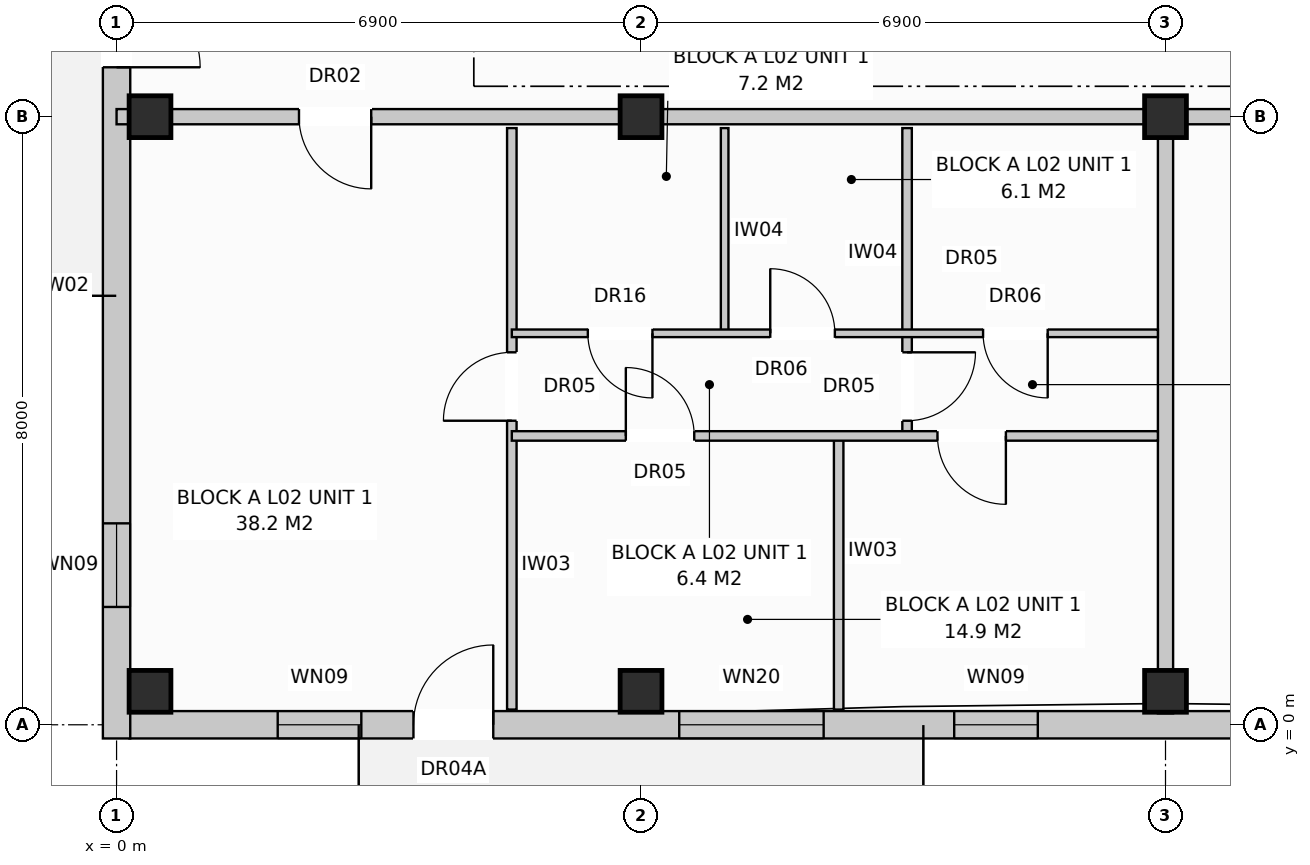
"""IFC4 building model, lengths in metres.
Left out: names, types, materials, properties, quantities, classifications, styles, units other than length and angle.
Written with IfcOpenShell. Run it as: python <this file> out.ifc"""

import sys

from ifc_helpers import new_model, si_unit, direction, frame, frame_2d, origin, origin_with_axes, origin_2d, place, context, subcontext, project, spatial, rectangle, extrude, element, fill, save


model = new_model("IFC4")
c1 = context("Model", 3, precision=1e-05, world=origin(), true_north=direction((0.0, 1.0)))
c2 = subcontext(c1, "Body", "Model", "MODEL_VIEW")
j1 = project(units=[si_unit("LENGTHUNIT", "METRE"), si_unit("PLANEANGLEUNIT", "RADIAN")], contexts=[c1])
p1 = place(None, origin())
s1 = spatial("IfcSite", under=j1, at=p1, CompositionType="ELEMENT")
p2 = place(p1, origin())
s2 = spatial("IfcBuilding", under=s1, at=p2, CompositionType="ELEMENT")
p3 = place(p2, frame((0.0, 0.0, 8.0)))
s3 = spatial("IfcBuildingStorey", under=s2, at=p3, CompositionType="ELEMENT", Elevation=8.0)
for number, where, z_axis, x_axis in (
    (1, (0.44, 0.44, 0.0), (0.0, 0.0, 1.0), (1.0, 0.0, 0.0)),
    (2, (0.44, 8.0, 0.0), (0.0, 0.0, 1.0), (1.0, 0.0, 0.0)),
    (3, (6.9, 0.44, 0.0), (0.0, 0.0, 1.0), (1.0, 0.0, 0.0)),
    (4, (6.9, 8.0, 0.0), (0.0, 0.0, 1.0), (1.0, 0.0, 0.0)),
    (5, (13.8, 0.44, 0.0), (0.0, 0.0, 1.0), (1.0, 0.0, 0.0)),
    (6, (13.8, 8.0, 0.0), (0.0, 0.0, 1.0), (1.0, 0.0, 0.0)),
):
    element("IfcColumn", number, at=place(p3, frame(where, z_axis=z_axis, x_axis=x_axis)), inside=s3, PredefinedType="COLUMN", context=c2, shape_type="SweptSolid", body=[
        extrude(rectangle(XDim=0.55, YDim=0.55, at=origin_2d()), origin(), (0.0, 0.0, 1.0), 3.2),
    ])
p4 = place(p3, frame((0.17, 0.0, 0.0), z_axis=(0.0, 0.0, 1.0), x_axis=(1.0, 0.0, 0.0)))
e7 = element("IfcWall", 7, at=p4, inside=s3, PredefinedType="STANDARD", context=c2, shape_type="SweptSolid", body=[
    extrude(rectangle(XDim=54.86, YDim=0.36, at=frame_2d((27.43, 0.0))), origin(), (0.0, 0.0, 1.0), 2.94),
])
p5 = place(p4, frame((3.736, 0.0, 0.0)))
e8 = element("IfcOpeningElement", 8, at=p5, cuts=e7, PredefinedType="OPENING", context=c2, shape_type="SweptSolid", body=[
    extrude(rectangle(XDim=1.05, YDim=2.12, at=frame_2d((0.525, 1.06))), frame((0.0, 0.192, 0.0), z_axis=(0.0, -1.0, 0.0), x_axis=(1.0, 0.0, 0.0)), (0.0, 0.0, 1.0), 0.384),
])
p6 = place(p4, frame((18.636, 0.0, 0.0)))
e9 = element("IfcOpeningElement", 9, at=p6, cuts=e7, PredefinedType="OPENING", context=c2, shape_type="SweptSolid", body=[
    extrude(rectangle(XDim=1.05, YDim=2.12, at=frame_2d((0.525, 1.06))), frame((0.0, 0.192, 0.0), z_axis=(0.0, -1.0, 0.0), x_axis=(1.0, 0.0, 0.0)), (0.0, 0.0, 1.0), 0.384),
])
p7 = place(p4, frame((32.636, 0.0, 0.0)))
e10 = element("IfcOpeningElement", 10, at=p7, cuts=e7, PredefinedType="OPENING", context=c2, shape_type="SweptSolid", body=[
    extrude(rectangle(XDim=1.05, YDim=2.12, at=frame_2d((0.525, 1.06))), frame((0.0, 0.192, 0.0), z_axis=(0.0, -1.0, 0.0), x_axis=(1.0, 0.0, 0.0)), (0.0, 0.0, 1.0), 0.384),
])
p8 = place(p4, frame((46.441, 0.0, 0.0)))
e11 = element("IfcOpeningElement", 11, at=p8, cuts=e7, PredefinedType="OPENING", context=c2, shape_type="SweptSolid", body=[
    extrude(rectangle(XDim=1.05, YDim=2.12, at=frame_2d((0.525, 1.06))), frame((0.0, 0.192, 0.0), z_axis=(0.0, -1.0, 0.0), x_axis=(1.0, 0.0, 0.0)), (0.0, 0.0, 1.0), 0.384),
])
p9 = place(p4, frame((1.95, 0.0, 0.72)))
e12 = element("IfcOpeningElement", 12, at=p9, cuts=e7, PredefinedType="OPENING", context=c2, shape_type="SweptSolid", body=[
    extrude(rectangle(XDim=1.1, YDim=1.5, at=frame_2d((0.55, 0.75))), frame((0.0, 0.192, 0.0), z_axis=(0.0, -1.0, 0.0), x_axis=(1.0, 0.0, 0.0)), (0.0, 0.0, 1.0), 0.384),
])
p10 = place(p4, frame((7.232, 0.0, 0.72)))
e13 = element("IfcOpeningElement", 13, at=p10, cuts=e7, PredefinedType="OPENING", context=c2, shape_type="SweptSolid", body=[
    extrude(rectangle(XDim=1.9, YDim=1.85, at=frame_2d((0.95, 0.925))), frame((0.0, 0.192, 0.0), z_axis=(0.0, -1.0, 0.0), x_axis=(1.0, 0.0, 0.0)), (0.0, 0.0, 1.0), 0.384),
])
p11 = place(p4, frame((10.85, 0.0, 0.72)))
e14 = element("IfcOpeningElement", 14, at=p11, cuts=e7, PredefinedType="OPENING", context=c2, shape_type="SweptSolid", body=[
    extrude(rectangle(XDim=1.1, YDim=1.5, at=frame_2d((0.55, 0.75))), frame((0.0, 0.192, 0.0), z_axis=(0.0, -1.0, 0.0), x_axis=(1.0, 0.0, 0.0)), (0.0, 0.0, 1.0), 0.384),
])
p12 = place(p4, frame((16.25, 0.0, 0.72)))
e15 = element("IfcOpeningElement", 15, at=p12, cuts=e7, PredefinedType="OPENING", context=c2, shape_type="SweptSolid", body=[
    extrude(rectangle(XDim=1.1, YDim=1.5, at=frame_2d((0.55, 0.75))), frame((0.0, 0.192, 0.0), z_axis=(0.0, -1.0, 0.0), x_axis=(1.0, 0.0, 0.0)), (0.0, 0.0, 1.0), 0.384),
])
p13 = place(p4, frame((21.55, 0.0, 0.72)))
e16 = element("IfcOpeningElement", 16, at=p13, cuts=e7, PredefinedType="OPENING", context=c2, shape_type="SweptSolid", body=[
    extrude(rectangle(XDim=1.9, YDim=1.85, at=frame_2d((0.95, 0.925))), frame((0.0, 0.192, 0.0), z_axis=(0.0, -1.0, 0.0), x_axis=(1.0, 0.0, 0.0)), (0.0, 0.0, 1.0), 0.384),
])
p14 = place(p4, frame((28.35, 0.0, 0.72)))
e17 = element("IfcOpeningElement", 17, at=p14, cuts=e7, PredefinedType="OPENING", context=c2, shape_type="SweptSolid", body=[
    extrude(rectangle(XDim=1.1, YDim=1.5, at=frame_2d((0.55, 0.75))), frame((0.0, 0.192, 0.0), z_axis=(0.0, -1.0, 0.0), x_axis=(1.0, 0.0, 0.0)), (0.0, 0.0, 1.0), 0.384),
])
p15 = place(p4, frame((30.8, 0.0, 0.85)))
e18 = element("IfcOpeningElement", 18, at=p15, cuts=e7, PredefinedType="OPENING", context=c2, shape_type="SweptSolid", body=[
    extrude(rectangle(XDim=1.5, YDim=1.65, at=frame_2d((0.75, 0.825))), frame((0.0, 0.192, 0.0), z_axis=(0.0, -1.0, 0.0), x_axis=(1.0, 0.0, 0.0)), (0.0, 0.0, 1.0), 0.384),
])
p16 = place(p4, frame((35.55, 0.0, 0.72)))
e19 = element("IfcOpeningElement", 19, at=p16, cuts=e7, PredefinedType="OPENING", context=c2, shape_type="SweptSolid", body=[
    extrude(rectangle(XDim=1.9, YDim=1.85, at=frame_2d((0.95, 0.925))), frame((0.0, 0.192, 0.0), z_axis=(0.0, -1.0, 0.0), x_axis=(1.0, 0.0, 0.0)), (0.0, 0.0, 1.0), 0.384),
])
p17 = place(p4, frame((39.25, 0.0, 0.72)))
e20 = element("IfcOpeningElement", 20, at=p17, cuts=e7, PredefinedType="OPENING", context=c2, shape_type="SweptSolid", body=[
    extrude(rectangle(XDim=1.1, YDim=1.5, at=frame_2d((0.55, 0.75))), frame((0.0, 0.192, 0.0), z_axis=(0.0, -1.0, 0.0), x_axis=(1.0, 0.0, 0.0)), (0.0, 0.0, 1.0), 0.384),
])
p18 = place(p4, frame((44.3, 0.0, 0.8)))
e21 = element("IfcOpeningElement", 21, at=p18, cuts=e7, PredefinedType="OPENING", context=c2, shape_type="SweptSolid", body=[
    extrude(rectangle(XDim=1.8, YDim=1.7, at=frame_2d((0.9, 0.85))), frame((0.0, 0.192, 0.0), z_axis=(0.0, -1.0, 0.0), x_axis=(1.0, 0.0, 0.0)), (0.0, 0.0, 1.0), 0.384),
])
p19 = place(p4, frame((49.15, 0.0, 0.72)))
e22 = element("IfcOpeningElement", 22, at=p19, cuts=e7, PredefinedType="OPENING", context=c2, shape_type="SweptSolid", body=[
    extrude(rectangle(XDim=1.9, YDim=1.85, at=frame_2d((0.95, 0.925))), frame((0.0, 0.192, 0.0), z_axis=(0.0, -1.0, 0.0), x_axis=(1.0, 0.0, 0.0)), (0.0, 0.0, 1.0), 0.384),
])
p20 = place(p4, frame((52.95, 0.0, 0.72)))
e23 = element("IfcOpeningElement", 23, at=p20, cuts=e7, PredefinedType="OPENING", context=c2, shape_type="SweptSolid", body=[
    extrude(rectangle(XDim=1.1, YDim=1.5, at=frame_2d((0.55, 0.75))), frame((0.0, 0.192, 0.0), z_axis=(0.0, -1.0, 0.0), x_axis=(1.0, 0.0, 0.0)), (0.0, 0.0, 1.0), 0.384),
])
p21 = place(p3, frame((0.0, -0.18, 0.0), z_axis=(0.0, 0.0, 1.0), x_axis=(0.0, 1.0, 0.0)))
e24 = element("IfcWall", 24, at=p21, inside=s3, PredefinedType="STANDARD", context=c2, shape_type="SweptSolid", body=[
    extrude(rectangle(XDim=18.76, YDim=0.36, at=frame_2d((9.38, 0.0))), origin(), (0.0, 0.0, 1.0), 2.94),
])
p22 = place(p21, frame((8.83, 0.0, 0.0)))
e25 = element("IfcOpeningElement", 25, at=p22, cuts=e24, PredefinedType="OPENING", context=c2, shape_type="SweptSolid", body=[
    extrude(rectangle(XDim=1.1, YDim=2.1, at=frame_2d((0.55, 1.05))), frame((0.0, 0.192, 0.0), z_axis=(0.0, -1.0, 0.0), x_axis=(1.0, 0.0, 0.0)), (0.0, 0.0, 1.0), 0.384),
])
p23 = place(p21, frame((1.73, 0.0, 0.72)))
e26 = element("IfcOpeningElement", 26, at=p23, cuts=e24, PredefinedType="OPENING", context=c2, shape_type="SweptSolid", body=[
    extrude(rectangle(XDim=1.1, YDim=1.5, at=frame_2d((0.55, 0.75))), frame((0.0, 0.192, 0.0), z_axis=(0.0, -1.0, 0.0), x_axis=(1.0, 0.0, 0.0)), (0.0, 0.0, 1.0), 0.384),
])
p24 = place(p21, frame((15.93, 0.0, 0.72)))
e27 = element("IfcOpeningElement", 27, at=p24, cuts=e24, PredefinedType="OPENING", context=c2, shape_type="SweptSolid", body=[
    extrude(rectangle(XDim=1.1, YDim=1.5, at=frame_2d((0.55, 0.75))), frame((0.0, 0.192, 0.0), z_axis=(0.0, -1.0, 0.0), x_axis=(1.0, 0.0, 0.0)), (0.0, 0.0, 1.0), 0.384),
])
p25 = place(p3, frame((13.8, 7.85, 0.0), z_axis=(0.0, 0.0, 1.0), x_axis=(0.0, -1.0, 0.0)))
e28 = element("IfcWall", 28, at=p25, inside=s3, PredefinedType="PARTITIONING", context=c2, shape_type="SweptSolid", body=[
    extrude(rectangle(XDim=7.7, YDim=0.2, at=frame_2d((3.85, 0.0))), origin(), (0.0, 0.0, 1.0), 2.94),
])
p26 = place(p3, frame((0.0, 8.0, 0.0), z_axis=(0.0, 0.0, 1.0), x_axis=(1.0, 0.0, 0.0)))
e29 = element("IfcWall", 29, at=p26, inside=s3, PredefinedType="PARTITIONING", context=c2, shape_type="SweptSolid", body=[
    extrude(rectangle(XDim=13.8, YDim=0.2, at=frame_2d((6.9, 0.0))), origin(), (0.0, 0.0, 1.0), 2.38),
])
p27 = place(p26, frame((2.4, 0.0, 0.0)))
e30 = element("IfcOpeningElement", 30, at=p27, cuts=e29, PredefinedType="OPENING", context=c2, shape_type="SweptSolid", body=[
    extrude(rectangle(XDim=0.95, YDim=2.15, at=frame_2d((0.475, 1.075))), frame((0.0, 0.112, 0.0), z_axis=(0.0, -1.0, 0.0), x_axis=(1.0, 0.0, 0.0)), (0.0, 0.0, 1.0), 0.224),
])
p28 = place(p3, frame((5.2, 7.85, 0.0), z_axis=(0.0, 0.0, 1.0), x_axis=(0.0, -1.0, 0.0)))
e31 = element("IfcWall", 31, at=p28, inside=s3, PredefinedType="PARTITIONING", context=c2, shape_type="SweptSolid", body=[
    extrude(rectangle(XDim=7.65, YDim=0.125, at=frame_2d((3.825, 0.0))), origin(), (0.0, 0.0, 1.0), 2.94),
])
p29 = place(p28, frame((2.95, 0.0, 0.0)))
e32 = element("IfcOpeningElement", 32, at=p29, cuts=e31, PredefinedType="OPENING", context=c2, shape_type="SweptSolid", body=[
    extrude(rectangle(XDim=0.9, YDim=2.1, at=frame_2d((0.45, 1.05))), frame((0.0, 0.074, 0.0), z_axis=(0.0, -1.0, 0.0), x_axis=(1.0, 0.0, 0.0)), (0.0, 0.0, 1.0), 0.149),
])
p30 = place(p3, frame((8.0, 7.85, 0.0), z_axis=(0.0, 0.0, 1.0), x_axis=(0.0, -1.0, 0.0)))
e33 = element("IfcWall", 33, at=p30, inside=s3, PredefinedType="PARTITIONING", context=c2, shape_type="SweptSolid", body=[
    extrude(rectangle(XDim=2.7, YDim=0.1, at=frame_2d((1.35, 0.0))), origin(), (0.0, 0.0, 1.0), 2.94),
])
p31 = place(p3, frame((10.4, 7.85, 0.0), z_axis=(0.0, 0.0, 1.0), x_axis=(0.0, -1.0, 0.0)))
e34 = element("IfcWall", 34, at=p31, inside=s3, PredefinedType="PARTITIONING", context=c2, shape_type="SweptSolid", body=[
    extrude(rectangle(XDim=4.05, YDim=0.125, at=frame_2d((2.025, 0.0))), origin(), (0.0, 0.0, 1.0), 2.94),
])
p32 = place(p31, frame((2.95, 0.0, 0.0)))
e35 = element("IfcOpeningElement", 35, at=p32, cuts=e34, PredefinedType="OPENING", context=c2, shape_type="SweptSolid", body=[
    extrude(rectangle(XDim=0.9, YDim=2.1, at=frame_2d((0.45, 1.05))), frame((0.0, 0.074, 0.0), z_axis=(0.0, -1.0, 0.0), x_axis=(1.0, 0.0, 0.0)), (0.0, 0.0, 1.0), 0.149),
])
p33 = place(p3, frame((9.5, 3.8, 0.0), z_axis=(0.0, 0.0, 1.0), x_axis=(0.0, -1.0, 0.0)))
e36 = element("IfcWall", 36, at=p33, inside=s3, PredefinedType="PARTITIONING", context=c2, shape_type="SweptSolid", body=[
    extrude(rectangle(XDim=3.6, YDim=0.125, at=frame_2d((1.8, 0.0))), origin(), (0.0, 0.0, 1.0), 2.94),
])
p34 = place(p3, frame((5.2, 5.15, 0.0), z_axis=(0.0, 0.0, 1.0), x_axis=(1.0, 0.0, 0.0)))
e37 = element("IfcWall", 37, at=p34, inside=s3, PredefinedType="PARTITIONING", context=c2, shape_type="SweptSolid", body=[
    extrude(rectangle(XDim=8.5, YDim=0.1, at=frame_2d((4.25, 0.0))), origin(), (0.0, 0.0, 1.0), 2.94),
])
p35 = place(p34, frame((1.0, 0.0, 0.0)))
e38 = element("IfcOpeningElement", 38, at=p35, cuts=e37, PredefinedType="OPENING", context=c2, shape_type="SweptSolid", body=[
    extrude(rectangle(XDim=0.85, YDim=2.1, at=frame_2d((0.425, 1.05))), frame((0.0, 0.062, 0.0), z_axis=(0.0, -1.0, 0.0), x_axis=(1.0, 0.0, 0.0)), (0.0, 0.0, 1.0), 0.124),
])
p36 = place(p34, frame((3.4, 0.0, 0.0)))
e39 = element("IfcOpeningElement", 39, at=p36, cuts=e37, PredefinedType="OPENING", context=c2, shape_type="SweptSolid", body=[
    extrude(rectangle(XDim=0.85, YDim=2.05, at=frame_2d((0.425, 1.025))), frame((0.0, 0.062, 0.0), z_axis=(0.0, -1.0, 0.0), x_axis=(1.0, 0.0, 0.0)), (0.0, 0.0, 1.0), 0.124),
])
p37 = place(p34, frame((6.2, 0.0, 0.0)))
e40 = element("IfcOpeningElement", 40, at=p37, cuts=e37, PredefinedType="OPENING", context=c2, shape_type="SweptSolid", body=[
    extrude(rectangle(XDim=0.85, YDim=2.05, at=frame_2d((0.425, 1.025))), frame((0.0, 0.062, 0.0), z_axis=(0.0, -1.0, 0.0), x_axis=(1.0, 0.0, 0.0)), (0.0, 0.0, 1.0), 0.124),
])
p38 = place(p3, frame((5.2, 3.8, 0.0), z_axis=(0.0, 0.0, 1.0), x_axis=(1.0, 0.0, 0.0)))
e41 = element("IfcWall", 41, at=p38, inside=s3, PredefinedType="PARTITIONING", context=c2, shape_type="SweptSolid", body=[
    extrude(rectangle(XDim=8.5, YDim=0.125, at=frame_2d((4.25, 0.0))), origin(), (0.0, 0.0, 1.0), 2.94),
])
p39 = place(p38, frame((1.5, 0.0, 0.0)))
e42 = element("IfcOpeningElement", 42, at=p39, cuts=e41, PredefinedType="OPENING", context=c2, shape_type="SweptSolid", body=[
    extrude(rectangle(XDim=0.9, YDim=2.1, at=frame_2d((0.45, 1.05))), frame((0.0, 0.074, 0.0), z_axis=(0.0, -1.0, 0.0), x_axis=(1.0, 0.0, 0.0)), (0.0, 0.0, 1.0), 0.149),
])
p40 = place(p38, frame((5.6, 0.0, 0.0)))
e43 = element("IfcOpeningElement", 43, at=p40, cuts=e41, PredefinedType="OPENING", context=c2, shape_type="SweptSolid", body=[
    extrude(rectangle(XDim=0.9, YDim=2.1, at=frame_2d((0.45, 1.05))), frame((0.0, 0.074, 0.0), z_axis=(0.0, -1.0, 0.0), x_axis=(1.0, 0.0, 0.0)), (0.0, 0.0, 1.0), 0.149),
])
p41 = place(p3, frame((13.8, 8.0, 0.0), z_axis=(0.0, 0.0, 1.0), x_axis=(1.0, 0.0, 0.0)))
e44 = element("IfcWall", 44, at=p41, inside=s3, PredefinedType="PARTITIONING", context=c2, shape_type="SweptSolid", body=[
    extrude(rectangle(XDim=20.7, YDim=0.2, at=frame_2d((10.35, 0.0))), origin(), (0.0, 0.0, 1.0), 2.38),
])
p42 = place(p41, frame((2.4, 0.0, 0.0)))
e45 = element("IfcOpeningElement", 45, at=p42, cuts=e44, PredefinedType="OPENING", context=c2, shape_type="SweptSolid", body=[
    extrude(rectangle(XDim=0.95, YDim=2.15, at=frame_2d((0.475, 1.075))), frame((0.0, 0.112, 0.0), z_axis=(0.0, -1.0, 0.0), x_axis=(1.0, 0.0, 0.0)), (0.0, 0.0, 1.0), 0.224),
])
p43 = place(p5, origin_with_axes())
e46 = element("IfcDoor", 46, at=p43, inside=s3, OperationType="SINGLE_SWING_RIGHT", PredefinedType="DOOR", context=c2, shape_type="SweptSolid", body=[
    extrude(rectangle(XDim=1.05, YDim=2.12, at=frame_2d((0.525, 1.06))), frame((0.0, 0.025, 0.0), z_axis=(0.0, -1.0, 0.0), x_axis=(1.0, 0.0, 0.0)), (0.0, 0.0, 1.0), 0.05),
])
fill(e8, e46)
p44 = place(p9, origin_with_axes())
e47 = element("IfcWindow", 47, at=p44, inside=s3, PartitioningType="SINGLE_PANEL", PredefinedType="WINDOW", context=c2, shape_type="SweptSolid", body=[
    extrude(rectangle(XDim=1.1, YDim=1.5, at=frame_2d((0.55, 0.75))), frame((0.0, 0.03, 0.0), z_axis=(0.0, -1.0, 0.0), x_axis=(1.0, 0.0, 0.0)), (0.0, 0.0, 1.0), 0.06),
])
fill(e12, e47)
p45 = place(p10, origin_with_axes())
e48 = element("IfcWindow", 48, at=p45, inside=s3, PartitioningType="SINGLE_PANEL", PredefinedType="WINDOW", context=c2, shape_type="SweptSolid", body=[
    extrude(rectangle(XDim=1.9, YDim=1.85, at=frame_2d((0.95, 0.925))), frame((0.0, 0.03, 0.0), z_axis=(0.0, -1.0, 0.0), x_axis=(1.0, 0.0, 0.0)), (0.0, 0.0, 1.0), 0.06),
])
fill(e13, e48)
p46 = place(p11, origin_with_axes())
e49 = element("IfcWindow", 49, at=p46, inside=s3, PartitioningType="SINGLE_PANEL", PredefinedType="WINDOW", context=c2, shape_type="SweptSolid", body=[
    extrude(rectangle(XDim=1.1, YDim=1.5, at=frame_2d((0.55, 0.75))), frame((0.0, 0.03, 0.0), z_axis=(0.0, -1.0, 0.0), x_axis=(1.0, 0.0, 0.0)), (0.0, 0.0, 1.0), 0.06),
])
fill(e14, e49)
p47 = place(p22, frame((1.1, 0.0, 0.0), z_axis=(0.0, 0.0, 1.0), x_axis=(-1.0, 0.0, 0.0)))
e50 = element("IfcDoor", 50, at=p47, inside=s3, OperationType="SINGLE_SWING_LEFT", PredefinedType="DOOR", context=c2, shape_type="SweptSolid", body=[
    extrude(rectangle(XDim=1.1, YDim=2.1, at=frame_2d((0.55, 1.05))), frame((0.0, 0.025, 0.0), z_axis=(0.0, -1.0, 0.0), x_axis=(1.0, 0.0, 0.0)), (0.0, 0.0, 1.0), 0.05),
])
fill(e25, e50)
p48 = place(p23, origin_with_axes())
e51 = element("IfcWindow", 51, at=p48, inside=s3, PartitioningType="SINGLE_PANEL", PredefinedType="WINDOW", context=c2, shape_type="SweptSolid", body=[
    extrude(rectangle(XDim=1.1, YDim=1.5, at=frame_2d((0.55, 0.75))), frame((0.0, 0.03, 0.0), z_axis=(0.0, -1.0, 0.0), x_axis=(1.0, 0.0, 0.0)), (0.0, 0.0, 1.0), 0.06),
])
fill(e26, e51)
p49 = place(p27, frame((0.95, 0.0, 0.0), z_axis=(0.0, 0.0, 1.0), x_axis=(-1.0, 0.0, 0.0)))
e52 = element("IfcDoor", 52, at=p49, inside=s3, OperationType="SINGLE_SWING_RIGHT", PredefinedType="DOOR", context=c2, shape_type="SweptSolid", body=[
    extrude(rectangle(XDim=0.95, YDim=2.15, at=frame_2d((0.475, 1.075))), frame((0.0, 0.025, 0.0), z_axis=(0.0, -1.0, 0.0), x_axis=(1.0, 0.0, 0.0)), (0.0, 0.0, 1.0), 0.05),
])
fill(e30, e52)
p50 = place(p29, frame((0.9, 0.0, 0.0), z_axis=(0.0, 0.0, 1.0), x_axis=(-1.0, 0.0, 0.0)))
e53 = element("IfcDoor", 53, at=p50, inside=s3, OperationType="SINGLE_SWING_RIGHT", PredefinedType="DOOR", context=c2, shape_type="SweptSolid", body=[
    extrude(rectangle(XDim=0.9, YDim=2.1, at=frame_2d((0.45, 1.05))), frame((0.0, 0.025, 0.0), z_axis=(0.0, -1.0, 0.0), x_axis=(1.0, 0.0, 0.0)), (0.0, 0.0, 1.0), 0.05),
])
fill(e32, e53)
p51 = place(p32, origin_with_axes())
e54 = element("IfcDoor", 54, at=p51, inside=s3, OperationType="SINGLE_SWING_LEFT", PredefinedType="DOOR", context=c2, shape_type="SweptSolid", body=[
    extrude(rectangle(XDim=0.9, YDim=2.1, at=frame_2d((0.45, 1.05))), frame((0.0, 0.025, 0.0), z_axis=(0.0, -1.0, 0.0), x_axis=(1.0, 0.0, 0.0)), (0.0, 0.0, 1.0), 0.05),
])
fill(e35, e54)
p52 = place(p35, frame((0.85, 0.0, 0.0), z_axis=(0.0, 0.0, 1.0), x_axis=(-1.0, 0.0, 0.0)))
e55 = element("IfcDoor", 55, at=p52, inside=s3, OperationType="SINGLE_SWING_RIGHT", PredefinedType="DOOR", context=c2, shape_type="SweptSolid", body=[
    extrude(rectangle(XDim=0.85, YDim=2.1, at=frame_2d((0.425, 1.05))), frame((0.0, 0.025, 0.0), z_axis=(0.0, -1.0, 0.0), x_axis=(1.0, 0.0, 0.0)), (0.0, 0.0, 1.0), 0.05),
])
fill(e38, e55)
p53 = place(p36, origin_with_axes())
e56 = element("IfcDoor", 56, at=p53, inside=s3, OperationType="SINGLE_SWING_LEFT", PredefinedType="DOOR", context=c2, shape_type="SweptSolid", body=[
    extrude(rectangle(XDim=0.85, YDim=2.05, at=frame_2d((0.425, 1.025))), frame((0.0, 0.025, 0.0), z_axis=(0.0, -1.0, 0.0), x_axis=(1.0, 0.0, 0.0)), (0.0, 0.0, 1.0), 0.05),
])
fill(e39, e56)
p54 = place(p37, frame((0.85, 0.0, 0.0), z_axis=(0.0, 0.0, 1.0), x_axis=(-1.0, 0.0, 0.0)))
e57 = element("IfcDoor", 57, at=p54, inside=s3, OperationType="SINGLE_SWING_RIGHT", PredefinedType="DOOR", context=c2, shape_type="SweptSolid", body=[
    extrude(rectangle(XDim=0.85, YDim=2.05, at=frame_2d((0.425, 1.025))), frame((0.0, 0.025, 0.0), z_axis=(0.0, -1.0, 0.0), x_axis=(1.0, 0.0, 0.0)), (0.0, 0.0, 1.0), 0.05),
])
fill(e40, e57)
p55 = place(p39, origin_with_axes())
e58 = element("IfcDoor", 58, at=p55, inside=s3, OperationType="SINGLE_SWING_LEFT", PredefinedType="DOOR", context=c2, shape_type="SweptSolid", body=[
    extrude(rectangle(XDim=0.9, YDim=2.1, at=frame_2d((0.45, 1.05))), frame((0.0, 0.025, 0.0), z_axis=(0.0, -1.0, 0.0), x_axis=(1.0, 0.0, 0.0)), (0.0, 0.0, 1.0), 0.05),
])
fill(e42, e58)
p56 = place(p40, frame((0.9, 0.0, 0.0), z_axis=(0.0, 0.0, 1.0), x_axis=(-1.0, 0.0, 0.0)))
e59 = element("IfcDoor", 59, at=p56, inside=s3, OperationType="SINGLE_SWING_RIGHT", PredefinedType="DOOR", context=c2, shape_type="SweptSolid", body=[
    extrude(rectangle(XDim=0.9, YDim=2.1, at=frame_2d((0.45, 1.05))), frame((0.0, 0.025, 0.0), z_axis=(0.0, -1.0, 0.0), x_axis=(1.0, 0.0, 0.0)), (0.0, 0.0, 1.0), 0.05),
])
fill(e43, e59)
save(model, sys.argv[1])
